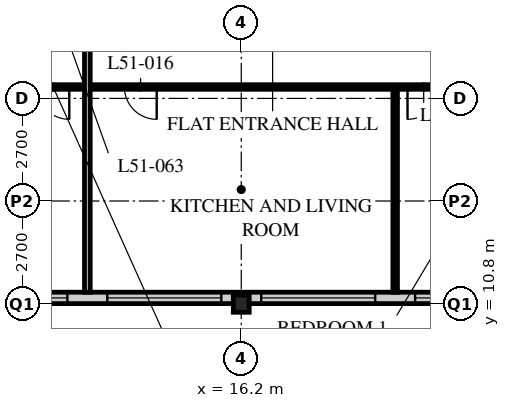
"""IFC4 building model, lengths in metres.
Left out: names, types, materials, properties, quantities, classifications, styles, units other than length and angle.
Written with IfcOpenShell. Run it as: python <this file> out.ifc"""

import sys

from ifc_helpers import new_model, si_unit, direction, frame, frame_2d, origin, origin_2d, place, context, subcontext, project, spatial, rectangle, i_section, extrude, element, fill, save


model = new_model("IFC4")
c1 = context("Model", 3, precision=1e-05, world=origin(), true_north=direction((0.0, 1.0)))
c2 = subcontext(c1, "Body", "Model", "MODEL_VIEW")
j1 = project(units=[si_unit("LENGTHUNIT", "METRE"), si_unit("PLANEANGLEUNIT", "RADIAN")], contexts=[c1])
p1 = place(None, origin())
s1 = spatial("IfcSite", under=j1, at=p1, CompositionType="ELEMENT")
p2 = place(p1, origin())
s2 = spatial("IfcBuilding", under=s1, at=p2, CompositionType="ELEMENT")
p3 = place(p2, frame((0.0, 0.0, 199.2)))
s3 = spatial("IfcBuildingStorey", under=s2, at=p3, CompositionType="ELEMENT", Elevation=199.2)
p4 = place(p3, frame((16.2, 10.8, 0.0), z_axis=(0.0, 0.0, 1.0), x_axis=(1.0, 0.0, 0.0)))
e1 = element("IfcColumn", 1, at=p4, inside=s3, PredefinedType="COLUMN", context=c2, shape_type="SweptSolid", body=[
    extrude(i_section(OverallWidth=0.418, OverallDepth=0.456, WebThickness=0.042, FlangeThickness=0.067, FilletRadius=0.015, at=origin_2d()), origin(), (0.0, 0.0, 1.0), 3.6),
])
p5 = place(p3, frame((8.4, 10.95, 0.0), z_axis=(0.0, 0.0, 1.0), x_axis=(1.0, 0.0, 0.0)))
e2 = element("IfcWall", 2, at=p5, inside=s3, PredefinedType="SOLIDWALL", context=c2, shape_type="SweptSolid", body=[
    extrude(rectangle(XDim=40.2, YDim=0.3, at=frame_2d((20.1, 0.0))), origin(), (0.0, 0.0, 1.0), 3.39),
])
p6 = place(p5, frame((0.225, 0.0, 0.6)))
e3 = element("IfcOpeningElement", 3, at=p6, cuts=e2, PredefinedType="OPENING", context=c2, shape_type="SweptSolid", body=[
    extrude(rectangle(XDim=3.0, YDim=2.4, at=frame_2d((1.5, 1.2))), frame((0.0, 0.16, 0.0), z_axis=(0.0, -1.0, 0.0), x_axis=(1.0, 0.0, 0.0)), (0.0, 0.0, 1.0), 0.32),
])
p7 = place(p5, frame((4.275, 0.0, 0.6)))
e4 = element("IfcOpeningElement", 4, at=p7, cuts=e2, PredefinedType="OPENING", context=c2, shape_type="SweptSolid", body=[
    extrude(rectangle(XDim=3.0, YDim=2.4, at=frame_2d((1.5, 1.2))), frame((0.0, 0.16, 0.0), z_axis=(0.0, -1.0, 0.0), x_axis=(1.0, 0.0, 0.0)), (0.0, 0.0, 1.0), 0.32),
])
p8 = place(p5, frame((8.325, 0.0, 0.6)))
e5 = element("IfcOpeningElement", 5, at=p8, cuts=e2, PredefinedType="OPENING", context=c2, shape_type="SweptSolid", body=[
    extrude(rectangle(XDim=3.0, YDim=2.4, at=frame_2d((1.5, 1.2))), frame((0.0, 0.16, 0.0), z_axis=(0.0, -1.0, 0.0), x_axis=(1.0, 0.0, 0.0)), (0.0, 0.0, 1.0), 0.32),
])
p9 = place(p5, frame((12.375, 0.0, 0.6)))
e6 = element("IfcOpeningElement", 6, at=p9, cuts=e2, PredefinedType="OPENING", context=c2, shape_type="SweptSolid", body=[
    extrude(rectangle(XDim=3.0, YDim=2.4, at=frame_2d((1.5, 1.2))), frame((0.0, 0.16, 0.0), z_axis=(0.0, -1.0, 0.0), x_axis=(1.0, 0.0, 0.0)), (0.0, 0.0, 1.0), 0.32),
])
p10 = place(p5, frame((16.425, 0.0, 0.6)))
e7 = element("IfcOpeningElement", 7, at=p10, cuts=e2, PredefinedType="OPENING", context=c2, shape_type="SweptSolid", body=[
    extrude(rectangle(XDim=3.0, YDim=2.4, at=frame_2d((1.5, 1.2))), frame((0.0, 0.16, 0.0), z_axis=(0.0, -1.0, 0.0), x_axis=(1.0, 0.0, 0.0)), (0.0, 0.0, 1.0), 0.32),
])
p11 = place(p5, frame((20.475, 0.0, 0.6)))
e8 = element("IfcOpeningElement", 8, at=p11, cuts=e2, PredefinedType="OPENING", context=c2, shape_type="SweptSolid", body=[
    extrude(rectangle(XDim=3.0, YDim=2.4, at=frame_2d((1.5, 1.2))), frame((0.0, 0.16, 0.0), z_axis=(0.0, -1.0, 0.0), x_axis=(1.0, 0.0, 0.0)), (0.0, 0.0, 1.0), 0.32),
])
p12 = place(p5, frame((24.525, 0.0, 0.6)))
e9 = element("IfcOpeningElement", 9, at=p12, cuts=e2, PredefinedType="OPENING", context=c2, shape_type="SweptSolid", body=[
    extrude(rectangle(XDim=3.0, YDim=2.4, at=frame_2d((1.5, 1.2))), frame((0.0, 0.16, 0.0), z_axis=(0.0, -1.0, 0.0), x_axis=(1.0, 0.0, 0.0)), (0.0, 0.0, 1.0), 0.32),
])
p13 = place(p5, frame((28.575, 0.0, 0.6)))
e10 = element("IfcOpeningElement", 10, at=p13, cuts=e2, PredefinedType="OPENING", context=c2, shape_type="SweptSolid", body=[
    extrude(rectangle(XDim=3.0, YDim=2.4, at=frame_2d((1.5, 1.2))), frame((0.0, 0.16, 0.0), z_axis=(0.0, -1.0, 0.0), x_axis=(1.0, 0.0, 0.0)), (0.0, 0.0, 1.0), 0.32),
])
p14 = place(p5, frame((32.625, 0.0, 0.6)))
e11 = element("IfcOpeningElement", 11, at=p14, cuts=e2, PredefinedType="OPENING", context=c2, shape_type="SweptSolid", body=[
    extrude(rectangle(XDim=3.0, YDim=2.4, at=frame_2d((1.5, 1.2))), frame((0.0, 0.16, 0.0), z_axis=(0.0, -1.0, 0.0), x_axis=(1.0, 0.0, 0.0)), (0.0, 0.0, 1.0), 0.32),
])
p15 = place(p5, frame((36.675, 0.0, 0.6)))
e12 = element("IfcOpeningElement", 12, at=p15, cuts=e2, PredefinedType="OPENING", context=c2, shape_type="SweptSolid", body=[
    extrude(rectangle(XDim=3.0, YDim=2.4, at=frame_2d((1.5, 1.2))), frame((0.0, 0.16, 0.0), z_axis=(0.0, -1.0, 0.0), x_axis=(1.0, 0.0, 0.0)), (0.0, 0.0, 1.0), 0.32),
])
p16 = place(p3, frame((20.25, 16.5, 0.0), z_axis=(0.0, 0.0, 1.0), x_axis=(0.0, -1.0, 0.0)))
e13 = element("IfcWall", 13, at=p16, inside=s3, PredefinedType="PARTITIONING", context=c2, shape_type="SweptSolid", body=[
    extrude(rectangle(XDim=5.4, YDim=0.12, at=frame_2d((2.7, 0.0))), origin(), (0.0, 0.0, 1.0), 3.39),
])
p17 = place(p3, frame((8.1, 16.5, 0.0), z_axis=(0.0, 0.0, 1.0), x_axis=(1.0, 0.0, 0.0)))
e14 = element("IfcWall", 14, at=p17, inside=s3, PredefinedType="PARTITIONING", context=c2, shape_type="SweptSolid", body=[
    extrude(rectangle(XDim=40.5, YDim=0.12, at=frame_2d((20.25, 0.0))), origin(), (0.0, 0.0, 1.0), 3.39),
])
p18 = place(p17, frame((5.025, 0.0, 0.0)))
e15 = element("IfcOpeningElement", 15, at=p18, cuts=e14, PredefinedType="OPENING", context=c2, shape_type="SweptSolid", body=[
    extrude(rectangle(XDim=0.85, YDim=2.1, at=frame_2d((0.425, 1.05))), frame((0.0, 0.07, 0.0), z_axis=(0.0, -1.0, 0.0), x_axis=(1.0, 0.0, 0.0)), (0.0, 0.0, 1.0), 0.14),
])
p19 = place(p17, frame((12.475, 0.0, 0.0)))
e16 = element("IfcOpeningElement", 16, at=p19, cuts=e14, PredefinedType="OPENING", context=c2, shape_type="SweptSolid", body=[
    extrude(rectangle(XDim=0.85, YDim=2.1, at=frame_2d((0.425, 1.05))), frame((0.0, 0.07, 0.0), z_axis=(0.0, -1.0, 0.0), x_axis=(1.0, 0.0, 0.0)), (0.0, 0.0, 1.0), 0.14),
])
p20 = place(p17, frame((17.175, 0.0, 0.0)))
e17 = element("IfcOpeningElement", 17, at=p20, cuts=e14, PredefinedType="OPENING", context=c2, shape_type="SweptSolid", body=[
    extrude(rectangle(XDim=0.85, YDim=2.1, at=frame_2d((0.425, 1.05))), frame((0.0, 0.07, 0.0), z_axis=(0.0, -1.0, 0.0), x_axis=(1.0, 0.0, 0.0)), (0.0, 0.0, 1.0), 0.14),
])
p21 = place(p17, frame((24.625, 0.0, 0.0)))
e18 = element("IfcOpeningElement", 18, at=p21, cuts=e14, PredefinedType="OPENING", context=c2, shape_type="SweptSolid", body=[
    extrude(rectangle(XDim=0.85, YDim=2.1, at=frame_2d((0.425, 1.05))), frame((0.0, 0.07, 0.0), z_axis=(0.0, -1.0, 0.0), x_axis=(1.0, 0.0, 0.0)), (0.0, 0.0, 1.0), 0.14),
])
p22 = place(p17, frame((29.325, 0.0, 0.0)))
e19 = element("IfcOpeningElement", 19, at=p22, cuts=e14, PredefinedType="OPENING", context=c2, shape_type="SweptSolid", body=[
    extrude(rectangle(XDim=0.85, YDim=2.1, at=frame_2d((0.425, 1.05))), frame((0.0, 0.07, 0.0), z_axis=(0.0, -1.0, 0.0), x_axis=(1.0, 0.0, 0.0)), (0.0, 0.0, 1.0), 0.14),
])
p23 = place(p17, frame((32.725, 0.0, 0.0)))
e20 = element("IfcOpeningElement", 20, at=p23, cuts=e14, PredefinedType="OPENING", context=c2, shape_type="SweptSolid", body=[
    extrude(rectangle(XDim=0.85, YDim=2.1, at=frame_2d((0.425, 1.05))), frame((0.0, 0.07, 0.0), z_axis=(0.0, -1.0, 0.0), x_axis=(1.0, 0.0, 0.0)), (0.0, 0.0, 1.0), 0.14),
])
p24 = place(p17, frame((2.725, 0.0, 0.0)))
e21 = element("IfcOpeningElement", 21, at=p24, cuts=e14, PredefinedType="OPENING", context=c2, shape_type="SweptSolid", body=[
    extrude(rectangle(XDim=0.85, YDim=2.1, at=frame_2d((0.425, 1.05))), frame((0.0, 0.07, 0.0), z_axis=(0.0, -1.0, 0.0), x_axis=(1.0, 0.0, 0.0)), (0.0, 0.0, 1.0), 0.14),
])
p25 = place(p17, frame((36.925, 0.0, 0.0)))
e22 = element("IfcOpeningElement", 22, at=p25, cuts=e14, PredefinedType="OPENING", context=c2, shape_type="SweptSolid", body=[
    extrude(rectangle(XDim=0.85, YDim=2.1, at=frame_2d((0.425, 1.05))), frame((0.0, 0.07, 0.0), z_axis=(0.0, -1.0, 0.0), x_axis=(1.0, 0.0, 0.0)), (0.0, 0.0, 1.0), 0.14),
])
p26 = place(p3, frame((12.15, 18.9, 0.0), z_axis=(0.0, 0.0, 1.0), x_axis=(0.0, -1.0, 0.0)))
e23 = element("IfcWall", 23, at=p26, inside=s3, PredefinedType="PARTITIONING", context=c2, shape_type="SweptSolid", body=[
    extrude(rectangle(XDim=7.8, YDim=0.15, at=frame_2d((3.9, 0.0))), origin(), (0.0, 0.0, 1.0), 3.39),
])
p27 = place(p6, origin())
e24 = element("IfcWindow", 24, at=p27, inside=s3, PartitioningType="SINGLE_PANEL", PredefinedType="WINDOW", context=c2, shape_type="SweptSolid", body=[
    extrude(rectangle(XDim=3.0, YDim=2.4, at=frame_2d((1.5, 1.2))), frame((0.0, 0.03, 0.0), z_axis=(0.0, -1.0, 0.0), x_axis=(1.0, 0.0, 0.0)), (0.0, 0.0, 1.0), 0.06),
])
fill(e3, e24)
p28 = place(p7, origin())
e25 = element("IfcWindow", 25, at=p28, inside=s3, PartitioningType="SINGLE_PANEL", PredefinedType="WINDOW", context=c2, shape_type="SweptSolid", body=[
    extrude(rectangle(XDim=3.0, YDim=2.4, at=frame_2d((1.5, 1.2))), frame((0.0, 0.03, 0.0), z_axis=(0.0, -1.0, 0.0), x_axis=(1.0, 0.0, 0.0)), (0.0, 0.0, 1.0), 0.06),
])
fill(e4, e25)
p29 = place(p8, origin())
e26 = element("IfcWindow", 26, at=p29, inside=s3, PartitioningType="SINGLE_PANEL", PredefinedType="WINDOW", context=c2, shape_type="SweptSolid", body=[
    extrude(rectangle(XDim=3.0, YDim=2.4, at=frame_2d((1.5, 1.2))), frame((0.0, 0.03, 0.0), z_axis=(0.0, -1.0, 0.0), x_axis=(1.0, 0.0, 0.0)), (0.0, 0.0, 1.0), 0.06),
])
fill(e5, e26)
p30 = place(p9, origin())
e27 = element("IfcWindow", 27, at=p30, inside=s3, PartitioningType="SINGLE_PANEL", PredefinedType="WINDOW", context=c2, shape_type="SweptSolid", body=[
    extrude(rectangle(XDim=3.0, YDim=2.4, at=frame_2d((1.5, 1.2))), frame((0.0, 0.03, 0.0), z_axis=(0.0, -1.0, 0.0), x_axis=(1.0, 0.0, 0.0)), (0.0, 0.0, 1.0), 0.06),
])
fill(e6, e27)
p31 = place(p18, origin())
e28 = element("IfcDoor", 28, at=p31, inside=s3, OperationType="SINGLE_SWING_LEFT", PredefinedType="DOOR", context=c2, shape_type="SweptSolid", body=[
    extrude(rectangle(XDim=0.85, YDim=2.1, at=frame_2d((0.425, 1.05))), frame((0.0, 0.025, 0.0), z_axis=(0.0, -1.0, 0.0), x_axis=(1.0, 0.0, 0.0)), (0.0, 0.0, 1.0), 0.05),
])
fill(e15, e28)
p32 = place(p19, origin())
e29 = element("IfcDoor", 29, at=p32, inside=s3, OperationType="SINGLE_SWING_RIGHT", PredefinedType="DOOR", context=c2, shape_type="SweptSolid", body=[
    extrude(rectangle(XDim=0.85, YDim=2.1, at=frame_2d((0.425, 1.05))), frame((0.0, 0.025, 0.0), z_axis=(0.0, -1.0, 0.0), x_axis=(1.0, 0.0, 0.0)), (0.0, 0.0, 1.0), 0.05),
])
fill(e16, e29)
p33 = place(p24, origin())
e30 = element("IfcDoor", 30, at=p33, inside=s3, OperationType="SINGLE_SWING_LEFT", PredefinedType="DOOR", context=c2, shape_type="SweptSolid", body=[
    extrude(rectangle(XDim=0.85, YDim=2.1, at=frame_2d((0.425, 1.05))), frame((0.0, 0.025, 0.0), z_axis=(0.0, -1.0, 0.0), x_axis=(1.0, 0.0, 0.0)), (0.0, 0.0, 1.0), 0.05),
])
fill(e21, e30)
save(model, sys.argv[1])
